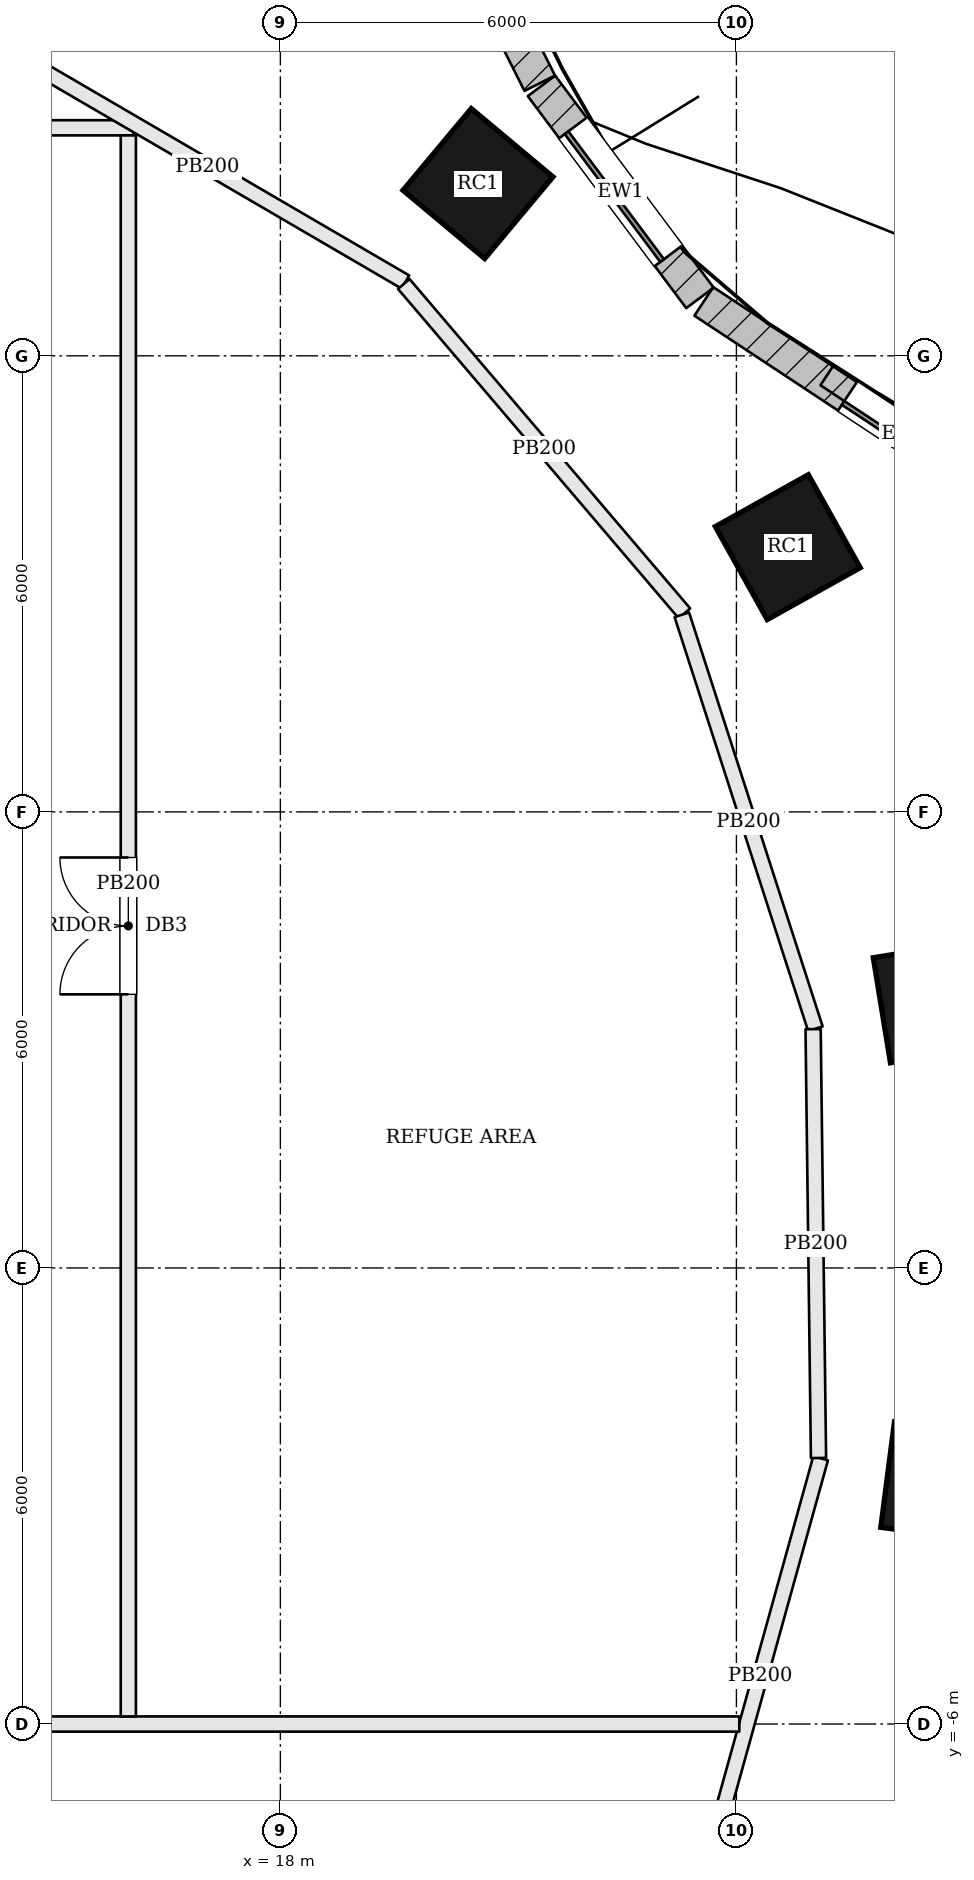
"""IFC4 building model, lengths in metres.
Left out: names, types, materials, properties, quantities, classifications, styles, units other than length and angle.
Written with IfcOpenShell. Run it as: python <this file> out.ifc"""

import sys

from ifc_helpers import new_model, si_unit, direction, frame, frame_2d, origin, origin_2d, place, context, subcontext, project, spatial, rectangle, extrude, element, fill, save


model = new_model("IFC4")
c1 = context("Model", 3, precision=1e-05, world=origin(), true_north=direction((0.0, 1.0)))
c2 = subcontext(c1, "Body", "Model", "MODEL_VIEW")
j1 = project(units=[si_unit("LENGTHUNIT", "METRE"), si_unit("PLANEANGLEUNIT", "RADIAN")], contexts=[c1])
p1 = place(None, origin())
s1 = spatial("IfcSite", under=j1, at=p1, CompositionType="ELEMENT")
p2 = place(p1, origin())
s2 = spatial("IfcBuilding", under=s1, at=p2, CompositionType="ELEMENT")
p3 = place(p2, frame((0.0, 0.0, 55.5)))
s3 = spatial("IfcBuildingStorey", under=s2, at=p3, CompositionType="ELEMENT", Elevation=55.5)
for number, where, z_axis, x_axis in (
    (1, (26.605, 3.503, 0.0), (0.0, 0.0, 1.0), (-0.161, 0.987, 0.0)),
    (2, (24.676, 9.483, 0.0), (0.0, 0.0, 1.0), (-0.487, 0.873, 0.0)),
    (3, (20.6, 14.266, 0.0), (0.0, 0.0, 1.0), (-0.767, 0.641, 0.0)),
    (4, (26.684, -2.808, 0.0), (0.0, 0.0, 1.0), (0.128, 0.992, 0.0)),
):
    element("IfcColumn", number, at=place(p3, frame(where, z_axis=z_axis, x_axis=x_axis)), inside=s3, PredefinedType="COLUMN", context=c2, shape_type="SweptSolid", body=[
        extrude(rectangle(XDim=1.4, YDim=1.4, at=origin_2d()), origin(), (0.0, 0.0, 1.0), 3.6),
    ])
p4 = place(p3, frame((28.853, 9.227, 0.0), z_axis=(0.0, 0.0, 1.0), x_axis=(-0.834404370393, 0.551152743502, 0.0)))
e5 = element("IfcWall", 5, at=p4, inside=s3, PredefinedType="SOLIDWALL", context=c2, shape_type="SweptSolid", body=[
    extrude(rectangle(XDim=6.33, YDim=0.45, at=frame_2d((3.165, 0.0))), origin(), (0.0, 0.0, 1.0), 3.4),
])
p5 = place(p4, frame((2.265, 0.0, 0.9)))
e6 = element("IfcOpeningElement", 6, at=p5, cuts=e5, PredefinedType="OPENING", context=c2, shape_type="SweptSolid", body=[
    extrude(rectangle(XDim=1.8, YDim=2.0, at=frame_2d((0.9, 1.0))), frame((0.0, 0.235, 0.0), z_axis=(0.0, -1.0, 0.0), x_axis=(1.0, 0.0, 0.0)), (0.0, 0.0, 1.0), 0.47),
])
p6 = place(p3, frame((23.52, 12.762, 0.0), z_axis=(0.0, 0.0, 1.0), x_axis=(-0.598664281495, 0.801000048728, 0.0)))
e7 = element("IfcWall", 7, at=p6, inside=s3, PredefinedType="SOLIDWALL", context=c2, shape_type="SweptSolid", body=[
    extrude(rectangle(XDim=3.482, YDim=0.45, at=frame_2d((1.741, 0.0))), origin(), (0.0, 0.0, 1.0), 3.4),
])
p7 = place(p6, frame((0.691, 0.0, 0.9)))
e8 = element("IfcOpeningElement", 8, at=p7, cuts=e7, PredefinedType="OPENING", context=c2, shape_type="SweptSolid", body=[
    extrude(rectangle(XDim=2.1, YDim=2.0, at=frame_2d((1.05, 1.0))), frame((0.0, 0.235, 0.0), z_axis=(0.0, -1.0, 0.0), x_axis=(1.0, 0.0, 0.0)), (0.0, 0.0, 1.0), 0.47),
])
p8 = place(p3, frame((21.413, 15.586, 0.0), z_axis=(0.0, 0.0, 1.0), x_axis=(-0.449428064685, 0.893316525467, 0.0)))
e9 = element("IfcWall", 9, at=p8, inside=s3, PredefinedType="SOLIDWALL", context=c2, shape_type="SweptSolid", body=[
    extrude(rectangle(XDim=4.407, YDim=0.45, at=frame_2d((2.204, 0.0))), origin(), (0.0, 0.0, 1.0), 3.4),
])
p9 = place(p8, frame((1.154, 0.0, 0.9)))
e10 = element("IfcOpeningElement", 10, at=p9, cuts=e9, PredefinedType="OPENING", context=c2, shape_type="SweptSolid", body=[
    extrude(rectangle(XDim=2.1, YDim=2.0, at=frame_2d((1.05, 1.0))), frame((0.0, 0.235, 0.0), z_axis=(0.0, -1.0, 0.0), x_axis=(1.0, 0.0, 0.0)), (0.0, 0.0, 1.0), 0.47),
])
p10 = place(p3, frame((28.807, 9.347, 3.6), z_axis=(0.0, 0.0, 1.0), x_axis=(-0.834398186729, 0.551162104995, 0.0)))
e11 = element("IfcWall", 11, at=p10, inside=s3, PredefinedType="PARAPET", context=c2, shape_type="SweptSolid", body=[
    extrude(rectangle(XDim=4.337, YDim=0.3, at=frame_2d((2.169, 0.0))), origin(), (0.0, 0.0, 1.0), 1.1),
])
p11 = place(p3, frame((25.108, -2.504, 0.0), z_axis=(0.0, 0.0, 1.0), x_axis=(-0.267461570452, -0.963568528093, 0.0)))
e12 = element("IfcWall", 12, at=p11, inside=s3, PredefinedType="PARTITIONING", context=c2, shape_type="SweptSolid", body=[
    extrude(rectangle(XDim=5.94, YDim=0.2, at=frame_2d((2.97, 0.0))), origin(), (0.0, 0.0, 1.0), 3.4),
])
p12 = place(p3, frame((-24.018, -6.0, 0.0), z_axis=(0.0, 0.0, 1.0), x_axis=(1.0, 0.0, 0.0)))
e13 = element("IfcWall", 13, at=p12, inside=s3, PredefinedType="PARTITIONING", context=c2, shape_type="SweptSolid", body=[
    extrude(rectangle(XDim=48.056, YDim=0.2, at=frame_2d((24.028, 0.0))), origin(), (0.0, 0.0, 1.0), 3.4),
])
p13 = place(p12, frame((23.118, 0.0, 0.0)))
e14 = element("IfcOpeningElement", 14, at=p13, cuts=e13, PredefinedType="OPENING", context=c2, shape_type="SweptSolid", body=[
    extrude(rectangle(XDim=1.8, YDim=2.1, at=frame_2d((0.9, 1.05))), frame((0.0, 0.11, 0.0), z_axis=(0.0, -1.0, 0.0), x_axis=(1.0, 0.0, 0.0)), (0.0, 0.0, 1.0), 0.22),
])
p14 = place(p3, frame((-16.139, 15.0, 0.0), z_axis=(0.0, 0.0, 1.0), x_axis=(1.0, 0.0, 0.0)))
e15 = element("IfcWall", 15, at=p14, inside=s3, PredefinedType="PARTITIONING", context=c2, shape_type="SweptSolid", body=[
    extrude(rectangle(XDim=32.205, YDim=0.2, at=frame_2d((16.103, 0.0))), origin(), (0.0, 0.0, 1.0), 3.4),
])
p15 = place(p14, frame((15.239, 0.0, 0.0)))
e16 = element("IfcOpeningElement", 16, at=p15, cuts=e15, PredefinedType="OPENING", context=c2, shape_type="SweptSolid", body=[
    extrude(rectangle(XDim=1.8, YDim=2.1, at=frame_2d((0.9, 1.05))), frame((0.0, 0.11, 0.0), z_axis=(0.0, -1.0, 0.0), x_axis=(1.0, 0.0, 0.0)), (0.0, 0.0, 1.0), 0.22),
])
p16 = place(p3, frame((14.436, 16.009, 0.0), z_axis=(0.0, 0.0, 1.0), x_axis=(0.863814140683, -0.503810609611, 0.0)))
e17 = element("IfcWall", 17, at=p16, inside=s3, PredefinedType="PARTITIONING", context=c2, shape_type="SweptSolid", body=[
    extrude(rectangle(XDim=6.03, YDim=0.2, at=frame_2d((3.015, 0.0))), origin(), (0.0, 0.0, 1.0), 3.4),
])
p17 = place(p3, frame((19.624, 12.945, 0.0), z_axis=(0.0, 0.0, 1.0), x_axis=(0.648549295441, -0.761172655435, 0.0)))
e18 = element("IfcWall", 18, at=p17, inside=s3, PredefinedType="PARTITIONING", context=c2, shape_type="SweptSolid", body=[
    extrude(rectangle(XDim=5.693, YDim=0.2, at=frame_2d((2.846, 0.0))), origin(), (0.0, 0.0, 1.0), 3.4),
])
p18 = place(p3, frame((23.282, 8.593, 0.0), z_axis=(0.0, 0.0, 1.0), x_axis=(0.307048901132, -0.951693738717, 0.0)))
e19 = element("IfcWall", 19, at=p18, inside=s3, PredefinedType="PARTITIONING", context=c2, shape_type="SweptSolid", body=[
    extrude(rectangle(XDim=5.722, YDim=0.2, at=frame_2d((2.861, 0.0))), origin(), (0.0, 0.0, 1.0), 3.4),
])
p19 = place(p3, frame((25.009, 3.142, 0.0), z_axis=(0.0, 0.0, 1.0), x_axis=(0.012590953382, -0.999920730805, 0.0)))
e20 = element("IfcWall", 20, at=p19, inside=s3, PredefinedType="PARTITIONING", context=c2, shape_type="SweptSolid", body=[
    extrude(rectangle(XDim=5.643, YDim=0.2, at=frame_2d((2.821, 0.0))), origin(), (0.0, 0.0, 1.0), 3.4),
])
p20 = place(p3, frame((16.0, -5.9, 0.0), z_axis=(0.0, 0.0, 1.0), x_axis=(0.0, 1.0, 0.0)))
e21 = element("IfcWall", 21, at=p20, inside=s3, PredefinedType="PARTITIONING", context=c2, shape_type="SweptSolid", body=[
    extrude(rectangle(XDim=20.8, YDim=0.2, at=frame_2d((10.4, 0.0))), origin(), (0.0, 0.0, 1.0), 3.4),
])
p21 = place(p20, frame((9.5, 0.0, 0.0)))
e22 = element("IfcOpeningElement", 22, at=p21, cuts=e21, PredefinedType="OPENING", context=c2, shape_type="SweptSolid", body=[
    extrude(rectangle(XDim=1.8, YDim=2.1, at=frame_2d((0.9, 1.05))), frame((0.0, 0.11, 0.0), z_axis=(0.0, -1.0, 0.0), x_axis=(1.0, 0.0, 0.0)), (0.0, 0.0, 1.0), 0.22),
])
p22 = place(p5, origin())
e23 = element("IfcWindow", 23, at=p22, inside=s3, PartitioningType="SINGLE_PANEL", PredefinedType="WINDOW", context=c2, shape_type="SweptSolid", body=[
    extrude(rectangle(XDim=1.8, YDim=2.0, at=frame_2d((0.9, 1.0))), frame((0.0, 0.135, 0.0), z_axis=(0.0, -1.0, 0.0), x_axis=(1.0, 0.0, 0.0)), (0.0, 0.0, 1.0), 0.06),
])
fill(e6, e23)
p23 = place(p7, origin())
e24 = element("IfcWindow", 24, at=p23, inside=s3, PartitioningType="SINGLE_PANEL", PredefinedType="WINDOW", context=c2, shape_type="SweptSolid", body=[
    extrude(rectangle(XDim=2.1, YDim=2.0, at=frame_2d((1.05, 1.0))), frame((0.0, 0.135, 0.0), z_axis=(0.0, -1.0, 0.0), x_axis=(1.0, 0.0, 0.0)), (0.0, 0.0, 1.0), 0.06),
])
fill(e8, e24)
p24 = place(p21, origin())
e25 = element("IfcDoor", 25, at=p24, inside=s3, OperationType="DOUBLE_DOOR_SINGLE_SWING", PredefinedType="DOOR", context=c2, shape_type="SweptSolid", body=[
    extrude(rectangle(XDim=1.8, YDim=2.1, at=frame_2d((0.9, 1.05))), frame((0.0, 0.025, 0.0), z_axis=(0.0, -1.0, 0.0), x_axis=(1.0, 0.0, 0.0)), (0.0, 0.0, 1.0), 0.05),
])
fill(e22, e25)
save(model, sys.argv[1])
